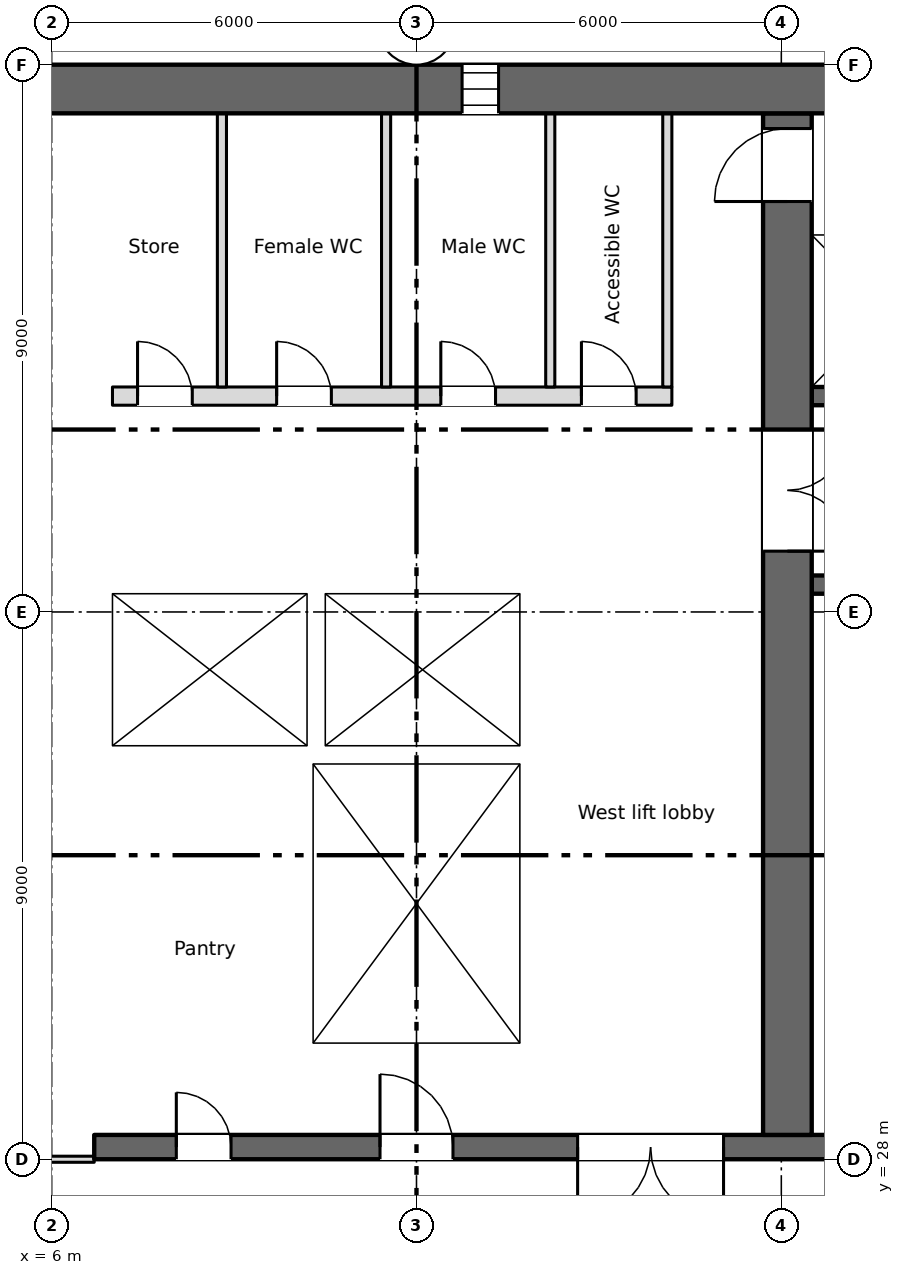
"""IFC4 building model, lengths in metres.
Left out: names, types, materials, properties, quantities, classifications, styles, units other than length and angle.
Written with IfcOpenShell. Run it as: python <this file> out.ifc"""

import sys

from ifc_helpers import new_model, si_unit, direction, frame, frame_2d, origin, place, context, subcontext, project, spatial, rectangle, extrude, element, fill, save


model = new_model("IFC4")
c1 = context("Model", 3, precision=1e-05, world=origin(), true_north=direction((0.0, 1.0)))
c2 = subcontext(c1, "Body", "Model", "MODEL_VIEW")
j1 = project(units=[si_unit("LENGTHUNIT", "METRE"), si_unit("PLANEANGLEUNIT", "RADIAN")], contexts=[c1])
p1 = place(None, origin())
s1 = spatial("IfcSite", under=j1, at=p1, CompositionType="ELEMENT")
p2 = place(p1, origin())
s2 = spatial("IfcBuilding", under=s1, at=p2, CompositionType="ELEMENT")
p3 = place(p2, frame((0.0, 0.0, 121.25)))
s3 = spatial("IfcBuildingStorey", under=s2, at=p3, CompositionType="ELEMENT", Elevation=121.25)
p4 = place(p3, frame((5.55, 45.6, 0.0), z_axis=(0.0, 0.0, 1.0), x_axis=(1.0, 0.0, 0.0)))
e1 = element("IfcWall", 1, at=p4, inside=s3, PredefinedType="SHEAR", context=c2, shape_type="SweptSolid", body=[
    extrude(rectangle(XDim=60.9, YDim=0.8, at=frame_2d((30.45, 0.0))), origin(), (0.0, 0.0, 1.0), 3.35),
])
p5 = place(p4, frame((7.2, 0.0, 0.6)))
e2 = element("IfcOpeningElement", 2, at=p5, cuts=e1, PredefinedType="OPENING", context=c2, shape_type="SweptSolid", body=[
    extrude(rectangle(XDim=0.6, YDim=2.4, at=frame_2d((0.3, 1.2))), frame((0.0, 0.41, 0.0), z_axis=(0.0, -1.0, 0.0), x_axis=(1.0, 0.0, 0.0)), (0.0, 0.0, 1.0), 0.82),
])
p6 = place(p3, frame((6.7, 28.2, 0.0), z_axis=(0.0, 0.0, 1.0), x_axis=(1.0, 0.0, 0.0)))
e3 = element("IfcWall", 3, at=p6, inside=s3, PredefinedType="SHEAR", context=c2, shape_type="SweptSolid", body=[
    extrude(rectangle(XDim=57.8, YDim=0.4, at=frame_2d((28.9, 0.0))), origin(), (0.0, 0.0, 1.0), 3.35),
])
p7 = place(p6, frame((12.062, 0.0, 0.0)))
e4 = element("IfcOpeningElement", 4, at=p7, cuts=e3, PredefinedType="OPENING", context=c2, shape_type="SweptSolid", body=[
    extrude(rectangle(XDim=0.9, YDim=2.1, at=frame_2d((0.45, 1.05))), frame((0.0, 0.21, 0.0), z_axis=(0.0, -1.0, 0.0), x_axis=(1.0, 0.0, 0.0)), (0.0, 0.0, 1.0), 0.42),
])
p8 = place(p6, frame((14.637, 0.0, 0.0)))
e5 = element("IfcOpeningElement", 5, at=p8, cuts=e3, PredefinedType="OPENING", context=c2, shape_type="SweptSolid", body=[
    extrude(rectangle(XDim=0.9, YDim=2.1, at=frame_2d((0.45, 1.05))), frame((0.0, 0.21, 0.0), z_axis=(0.0, -1.0, 0.0), x_axis=(1.0, 0.0, 0.0)), (0.0, 0.0, 1.0), 0.42),
])
p9 = place(p6, frame((49.062, 0.0, 0.0)))
e6 = element("IfcOpeningElement", 6, at=p9, cuts=e3, PredefinedType="OPENING", context=c2, shape_type="SweptSolid", body=[
    extrude(rectangle(XDim=0.9, YDim=2.1, at=frame_2d((0.45, 1.05))), frame((0.0, 0.21, 0.0), z_axis=(0.0, -1.0, 0.0), x_axis=(1.0, 0.0, 0.0)), (0.0, 0.0, 1.0), 0.42),
])
p10 = place(p6, frame((51.637, 0.0, 0.0)))
e7 = element("IfcOpeningElement", 7, at=p10, cuts=e3, PredefinedType="OPENING", context=c2, shape_type="SweptSolid", body=[
    extrude(rectangle(XDim=0.9, YDim=2.1, at=frame_2d((0.45, 1.05))), frame((0.0, 0.21, 0.0), z_axis=(0.0, -1.0, 0.0), x_axis=(1.0, 0.0, 0.0)), (0.0, 0.0, 1.0), 0.42),
])
p11 = place(p6, frame((1.35, 0.0, 0.0)))
e8 = element("IfcOpeningElement", 8, at=p11, cuts=e3, PredefinedType="OPENING", context=c2, shape_type="SweptSolid", body=[
    extrude(rectangle(XDim=0.9, YDim=2.1, at=frame_2d((0.45, 1.05))), frame((0.0, 0.21, 0.0), z_axis=(0.0, -1.0, 0.0), x_axis=(1.0, 0.0, 0.0)), (0.0, 0.0, 1.0), 0.42),
])
p12 = place(p6, frame((4.7, 0.0, 0.0)))
e9 = element("IfcOpeningElement", 9, at=p12, cuts=e3, PredefinedType="OPENING", context=c2, shape_type="SweptSolid", body=[
    extrude(rectangle(XDim=1.2, YDim=2.1, at=frame_2d((0.6, 1.05))), frame((0.0, 0.21, 0.0), z_axis=(0.0, -1.0, 0.0), x_axis=(1.0, 0.0, 0.0)), (0.0, 0.0, 1.0), 0.42),
])
p13 = place(p6, frame((31.7, 0.0, 0.0)))
e10 = element("IfcOpeningElement", 10, at=p13, cuts=e3, PredefinedType="OPENING", context=c2, shape_type="SweptSolid", body=[
    extrude(rectangle(XDim=1.2, YDim=2.1, at=frame_2d((0.6, 1.05))), frame((0.0, 0.21, 0.0), z_axis=(0.0, -1.0, 0.0), x_axis=(1.0, 0.0, 0.0)), (0.0, 0.0, 1.0), 0.42),
])
p14 = place(p6, frame((55.2, 0.0, 0.0)))
e11 = element("IfcOpeningElement", 11, at=p14, cuts=e3, PredefinedType="OPENING", context=c2, shape_type="SweptSolid", body=[
    extrude(rectangle(XDim=1.2, YDim=2.1, at=frame_2d((0.6, 1.05))), frame((0.0, 0.21, 0.0), z_axis=(0.0, -1.0, 0.0), x_axis=(1.0, 0.0, 0.0)), (0.0, 0.0, 1.0), 0.42),
])
p15 = place(p6, frame((21.7, 0.0, 0.0)))
e12 = element("IfcOpeningElement", 12, at=p15, cuts=e3, PredefinedType="OPENING", context=c2, shape_type="SweptSolid", body=[
    extrude(rectangle(XDim=1.2, YDim=2.1, at=frame_2d((0.6, 1.05))), frame((0.0, 0.21, 0.0), z_axis=(0.0, -1.0, 0.0), x_axis=(1.0, 0.0, 0.0)), (0.0, 0.0, 1.0), 0.42),
])
p16 = place(p6, frame((41.7, 0.0, 0.0)))
e13 = element("IfcOpeningElement", 13, at=p16, cuts=e3, PredefinedType="OPENING", context=c2, shape_type="SweptSolid", body=[
    extrude(rectangle(XDim=1.2, YDim=2.1, at=frame_2d((0.6, 1.05))), frame((0.0, 0.21, 0.0), z_axis=(0.0, -1.0, 0.0), x_axis=(1.0, 0.0, 0.0)), (0.0, 0.0, 1.0), 0.42),
])
p17 = place(p6, frame((24.85, 0.0, 0.0)))
e14 = element("IfcOpeningElement", 14, at=p17, cuts=e3, PredefinedType="OPENING", context=c2, shape_type="SweptSolid", body=[
    extrude(rectangle(XDim=2.4, YDim=2.1, at=frame_2d((1.2, 1.05))), frame((0.0, 0.21, 0.0), z_axis=(0.0, -1.0, 0.0), x_axis=(1.0, 0.0, 0.0)), (0.0, 0.0, 1.0), 0.42),
])
p18 = place(p6, frame((37.35, 0.0, 0.0)))
e15 = element("IfcOpeningElement", 15, at=p18, cuts=e3, PredefinedType="OPENING", context=c2, shape_type="SweptSolid", body=[
    extrude(rectangle(XDim=2.4, YDim=2.1, at=frame_2d((1.2, 1.05))), frame((0.0, 0.21, 0.0), z_axis=(0.0, -1.0, 0.0), x_axis=(1.0, 0.0, 0.0)), (0.0, 0.0, 1.0), 0.42),
])
p19 = place(p6, frame((7.95, 0.0, 0.0)))
e16 = element("IfcOpeningElement", 16, at=p19, cuts=e3, PredefinedType="OPENING", context=c2, shape_type="SweptSolid", body=[
    extrude(rectangle(XDim=2.4, YDim=2.1, at=frame_2d((1.2, 1.05))), frame((0.0, 0.21, 0.0), z_axis=(0.0, -1.0, 0.0), x_axis=(1.0, 0.0, 0.0)), (0.0, 0.0, 1.0), 0.42),
])
p20 = place(p6, frame((28.85, 0.0, 0.0)))
e17 = element("IfcOpeningElement", 17, at=p20, cuts=e3, PredefinedType="OPENING", context=c2, shape_type="SweptSolid", body=[
    extrude(rectangle(XDim=0.9, YDim=2.1, at=frame_2d((0.45, 1.05))), frame((0.0, 0.21, 0.0), z_axis=(0.0, -1.0, 0.0), x_axis=(1.0, 0.0, 0.0)), (0.0, 0.0, 1.0), 0.42),
])
p21 = place(p6, frame((34.85, 0.0, 0.0)))
e18 = element("IfcOpeningElement", 18, at=p21, cuts=e3, PredefinedType="OPENING", context=c2, shape_type="SweptSolid", body=[
    extrude(rectangle(XDim=0.9, YDim=2.1, at=frame_2d((0.45, 1.05))), frame((0.0, 0.21, 0.0), z_axis=(0.0, -1.0, 0.0), x_axis=(1.0, 0.0, 0.0)), (0.0, 0.0, 1.0), 0.42),
])
p22 = place(p3, frame((6.85, 28.4, 0.0), z_axis=(0.0, 0.0, 1.0), x_axis=(0.0, 1.0, 0.0)))
e19 = element("IfcWall", 19, at=p22, inside=s3, PredefinedType="SHEAR", context=c2, shape_type="SweptSolid", body=[
    extrude(rectangle(XDim=16.8, YDim=0.3, at=frame_2d((8.4, 0.0))), origin(), (0.0, 0.0, 1.0), 3.35),
])
p23 = place(p3, frame((18.1, 28.4, 0.0), z_axis=(0.0, 0.0, 1.0), x_axis=(0.0, 1.0, 0.0)))
e20 = element("IfcWall", 20, at=p23, inside=s3, PredefinedType="SHEAR", context=c2, shape_type="SweptSolid", body=[
    extrude(rectangle(XDim=16.8, YDim=0.8, at=frame_2d((8.4, 0.0))), origin(), (0.0, 0.0, 1.0), 3.35),
])
p24 = place(p23, frame((9.6, 0.0, 0.0)))
e21 = element("IfcOpeningElement", 21, at=p24, cuts=e20, PredefinedType="OPENING", context=c2, shape_type="SweptSolid", body=[
    extrude(rectangle(XDim=2.0, YDim=2.1, at=frame_2d((1.0, 1.05))), frame((0.0, 0.41, 0.0), z_axis=(0.0, -1.0, 0.0), x_axis=(1.0, 0.0, 0.0)), (0.0, 0.0, 1.0), 0.82),
])
p25 = place(p23, frame((15.35, 0.0, 0.0)))
e22 = element("IfcOpeningElement", 22, at=p25, cuts=e20, PredefinedType="OPENING", context=c2, shape_type="SweptSolid", body=[
    extrude(rectangle(XDim=1.2, YDim=2.1, at=frame_2d((0.6, 1.05))), frame((0.0, 0.41, 0.0), z_axis=(0.0, -1.0, 0.0), x_axis=(1.0, 0.0, 0.0)), (0.0, 0.0, 1.0), 0.82),
])
for number, where, z_axis, x_axis in (
    (23, (10.15, 28.4, 0.0), (0.0, 0.0, 1.0), (0.0, 1.0, 0.0)),
    (24, (13.85, 28.4, 0.0), (0.0, 0.0, 1.0), (0.0, 1.0, 0.0)),
):
    element("IfcWall", number, at=place(p3, frame(where, z_axis=z_axis, x_axis=x_axis)), inside=s3, PredefinedType="SHEAR", context=c2, shape_type="SweptSolid", body=[
        extrude(rectangle(XDim=6.1, YDim=0.3, at=frame_2d((3.05, 0.0))), origin(), (0.0, 0.0, 1.0), 3.35),
    ])
p26 = place(p3, frame((7.0, 34.65, 0.0), z_axis=(0.0, 0.0, 1.0), x_axis=(1.0, 0.0, 0.0)))
e25 = element("IfcWall", 25, at=p26, inside=s3, PredefinedType="SHEAR", context=c2, shape_type="SweptSolid", body=[
    extrude(rectangle(XDim=7.0, YDim=0.3, at=frame_2d((3.5, 0.0))), origin(), (0.0, 0.0, 1.0), 3.35),
])
p27 = place(p3, frame((18.5, 34.65, 0.0), z_axis=(0.0, 0.0, 1.0), x_axis=(1.0, 0.0, 0.0)))
e26 = element("IfcWall", 26, at=p27, inside=s3, PredefinedType="SHEAR", context=c2, shape_type="SweptSolid", body=[
    extrude(rectangle(XDim=12.2, YDim=0.3, at=frame_2d((6.1, 0.0))), origin(), (0.0, 0.0, 1.0), 3.35),
])
p28 = place(p27, frame((9.8, 0.0, 0.0)))
e27 = element("IfcOpeningElement", 27, at=p28, cuts=e26, PredefinedType="OPENING", context=c2, shape_type="SweptSolid", body=[
    extrude(rectangle(XDim=1.1, YDim=2.1, at=frame_2d((0.55, 1.05))), frame((0.0, 0.16, 0.0), z_axis=(0.0, -1.0, 0.0), x_axis=(1.0, 0.0, 0.0)), (0.0, 0.0, 1.0), 0.32),
])
p29 = place(p3, frame((7.0, 37.45, 0.0), z_axis=(0.0, 0.0, 1.0), x_axis=(1.0, 0.0, 0.0)))
e28 = element("IfcWall", 28, at=p29, inside=s3, PredefinedType="SHEAR", context=c2, shape_type="SweptSolid", body=[
    extrude(rectangle(XDim=7.0, YDim=0.3, at=frame_2d((3.5, 0.0))), origin(), (0.0, 0.0, 1.0), 3.35),
])
p30 = place(p3, frame((30.7, 37.45, 0.0), z_axis=(0.0, 0.0, 1.0), x_axis=(-1.0, 0.0, 0.0)))
e29 = element("IfcWall", 29, at=p30, inside=s3, PredefinedType="SHEAR", context=c2, shape_type="SweptSolid", body=[
    extrude(rectangle(XDim=12.2, YDim=0.3, at=frame_2d((6.1, 0.0))), origin(), (0.0, 0.0, 1.0), 3.35),
])
p31 = place(p30, frame((7.4, 0.0, 0.0)))
e30 = element("IfcOpeningElement", 30, at=p31, cuts=e29, PredefinedType="OPENING", context=c2, shape_type="SweptSolid", body=[
    extrude(rectangle(XDim=0.9, YDim=2.1, at=frame_2d((0.45, 1.05))), frame((0.0, 0.16, 0.0), z_axis=(0.0, -1.0, 0.0), x_axis=(1.0, 0.0, 0.0)), (0.0, 0.0, 1.0), 0.32),
])
p32 = place(p3, frame((13.85, 34.8, 0.0), z_axis=(0.0, 0.0, 1.0), x_axis=(0.0, 1.0, 0.0)))
e31 = element("IfcWall", 31, at=p32, inside=s3, PredefinedType="SHEAR", context=c2, shape_type="SweptSolid", body=[
    extrude(rectangle(XDim=2.5, YDim=0.3, at=frame_2d((1.25, 0.0))), origin(), (0.0, 0.0, 1.0), 3.35),
])
p33 = place(p3, frame((18.5, 40.55, 0.0), z_axis=(0.0, 0.0, 1.0), x_axis=(1.0, 0.0, 0.0)))
e32 = element("IfcWall", 32, at=p33, inside=s3, PredefinedType="SHEAR", context=c2, shape_type="SweptSolid", body=[
    extrude(rectangle(XDim=41.0, YDim=0.3, at=frame_2d((20.5, 0.0))), origin(), (0.0, 0.0, 1.0), 3.35),
])
p34 = place(p33, frame((18.65, 0.0, 0.0)))
e33 = element("IfcOpeningElement", 33, at=p34, cuts=e32, PredefinedType="OPENING", context=c2, shape_type="SweptSolid", body=[
    extrude(rectangle(XDim=0.9, YDim=2.1, at=frame_2d((0.45, 1.05))), frame((0.0, 0.16, 0.0), z_axis=(0.0, -1.0, 0.0), x_axis=(1.0, 0.0, 0.0)), (0.0, 0.0, 1.0), 0.32),
])
p35 = place(p33, frame((6.175, 0.0, 0.0)))
e34 = element("IfcOpeningElement", 34, at=p35, cuts=e32, PredefinedType="OPENING", context=c2, shape_type="SweptSolid", body=[
    extrude(rectangle(XDim=1.1, YDim=2.1, at=frame_2d((0.55, 1.05))), frame((0.0, 0.16, 0.0), z_axis=(0.0, -1.0, 0.0), x_axis=(1.0, 0.0, 0.0)), (0.0, 0.0, 1.0), 0.32),
])
p36 = place(p33, frame((8.925, 0.0, 0.0)))
e35 = element("IfcOpeningElement", 35, at=p36, cuts=e32, PredefinedType="OPENING", context=c2, shape_type="SweptSolid", body=[
    extrude(rectangle(XDim=1.1, YDim=2.1, at=frame_2d((0.55, 1.05))), frame((0.0, 0.16, 0.0), z_axis=(0.0, -1.0, 0.0), x_axis=(1.0, 0.0, 0.0)), (0.0, 0.0, 1.0), 0.32),
])
p37 = place(p33, frame((11.675, 0.0, 0.0)))
e36 = element("IfcOpeningElement", 36, at=p37, cuts=e32, PredefinedType="OPENING", context=c2, shape_type="SweptSolid", body=[
    extrude(rectangle(XDim=1.1, YDim=2.1, at=frame_2d((0.55, 1.05))), frame((0.0, 0.16, 0.0), z_axis=(0.0, -1.0, 0.0), x_axis=(1.0, 0.0, 0.0)), (0.0, 0.0, 1.0), 0.32),
])
p38 = place(p33, frame((30.925, 0.0, 0.0)))
e37 = element("IfcOpeningElement", 37, at=p38, cuts=e32, PredefinedType="OPENING", context=c2, shape_type="SweptSolid", body=[
    extrude(rectangle(XDim=1.1, YDim=2.1, at=frame_2d((0.55, 1.05))), frame((0.0, 0.16, 0.0), z_axis=(0.0, -1.0, 0.0), x_axis=(1.0, 0.0, 0.0)), (0.0, 0.0, 1.0), 0.32),
])
p39 = place(p33, frame((33.675, 0.0, 0.0)))
e38 = element("IfcOpeningElement", 38, at=p39, cuts=e32, PredefinedType="OPENING", context=c2, shape_type="SweptSolid", body=[
    extrude(rectangle(XDim=1.1, YDim=2.1, at=frame_2d((0.55, 1.05))), frame((0.0, 0.16, 0.0), z_axis=(0.0, -1.0, 0.0), x_axis=(1.0, 0.0, 0.0)), (0.0, 0.0, 1.0), 0.32),
])
p40 = place(p33, frame((36.375, 0.0, 0.0)))
e39 = element("IfcOpeningElement", 39, at=p40, cuts=e32, PredefinedType="OPENING", context=c2, shape_type="SweptSolid", body=[
    extrude(rectangle(XDim=1.2, YDim=2.1, at=frame_2d((0.6, 1.05))), frame((0.0, 0.16, 0.0), z_axis=(0.0, -1.0, 0.0), x_axis=(1.0, 0.0, 0.0)), (0.0, 0.0, 1.0), 0.32),
])
p41 = place(p33, frame((39.15, 0.0, 0.0)))
e40 = element("IfcOpeningElement", 40, at=p41, cuts=e32, PredefinedType="OPENING", context=c2, shape_type="SweptSolid", body=[
    extrude(rectangle(XDim=1.2, YDim=2.1, at=frame_2d((0.6, 1.05))), frame((0.0, 0.16, 0.0), z_axis=(0.0, -1.0, 0.0), x_axis=(1.0, 0.0, 0.0)), (0.0, 0.0, 1.0), 0.32),
])
p42 = place(p3, frame((18.5, 43.35, 0.0), z_axis=(0.0, 0.0, 1.0), x_axis=(1.0, 0.0, 0.0)))
e41 = element("IfcWall", 41, at=p42, inside=s3, PredefinedType="SHEAR", context=c2, shape_type="SweptSolid", body=[
    extrude(rectangle(XDim=41.0, YDim=0.3, at=frame_2d((20.5, 0.0))), origin(), (0.0, 0.0, 1.0), 3.35),
])
p43 = place(p3, frame((7.0, 40.55, 0.0), z_axis=(0.0, 0.0, 1.0), x_axis=(1.0, 0.0, 0.0)))
e42 = element("IfcWall", 42, at=p43, inside=s3, PredefinedType="PARTITIONING", context=c2, shape_type="SweptSolid", body=[
    extrude(rectangle(XDim=9.2, YDim=0.3, at=frame_2d((4.6, 0.0))), origin(), (0.0, 0.0, 1.0), 3.35),
])
p44 = place(p43, frame((0.413, 0.0, 0.0)))
e43 = element("IfcOpeningElement", 43, at=p44, cuts=e42, PredefinedType="OPENING", context=c2, shape_type="SweptSolid", body=[
    extrude(rectangle(XDim=0.9, YDim=2.1, at=frame_2d((0.45, 1.05))), frame((0.0, 0.16, 0.0), z_axis=(0.0, -1.0, 0.0), x_axis=(1.0, 0.0, 0.0)), (0.0, 0.0, 1.0), 0.32),
])
p45 = place(p43, frame((2.7, 0.0, 0.0)))
e44 = element("IfcOpeningElement", 44, at=p45, cuts=e42, PredefinedType="OPENING", context=c2, shape_type="SweptSolid", body=[
    extrude(rectangle(XDim=0.9, YDim=2.1, at=frame_2d((0.45, 1.05))), frame((0.0, 0.16, 0.0), z_axis=(0.0, -1.0, 0.0), x_axis=(1.0, 0.0, 0.0)), (0.0, 0.0, 1.0), 0.32),
])
p46 = place(p43, frame((5.4, 0.0, 0.0)))
e45 = element("IfcOpeningElement", 45, at=p46, cuts=e42, PredefinedType="OPENING", context=c2, shape_type="SweptSolid", body=[
    extrude(rectangle(XDim=0.9, YDim=2.1, at=frame_2d((0.45, 1.05))), frame((0.0, 0.16, 0.0), z_axis=(0.0, -1.0, 0.0), x_axis=(1.0, 0.0, 0.0)), (0.0, 0.0, 1.0), 0.32),
])
p47 = place(p43, frame((7.712, 0.0, 0.0)))
e46 = element("IfcOpeningElement", 46, at=p47, cuts=e42, PredefinedType="OPENING", context=c2, shape_type="SweptSolid", body=[
    extrude(rectangle(XDim=0.9, YDim=2.1, at=frame_2d((0.45, 1.05))), frame((0.0, 0.16, 0.0), z_axis=(0.0, -1.0, 0.0), x_axis=(1.0, 0.0, 0.0)), (0.0, 0.0, 1.0), 0.32),
])
p48 = place(p3, frame((10.35, 34.8, 0.0), z_axis=(0.0, 0.0, 1.0), x_axis=(0.0, 1.0, 0.0)))
e47 = element("IfcWall", 47, at=p48, inside=s3, PredefinedType="SHEAR", context=c2, shape_type="SweptSolid", body=[
    extrude(rectangle(XDim=2.5, YDim=0.3, at=frame_2d((1.25, 0.0))), origin(), (0.0, 0.0, 1.0), 3.35),
])
for number, where, z_axis, x_axis in (
    (48, (16.125, 40.7, 0.0), (0.0, 0.0, 1.0), (0.0, 1.0, 0.0)),
    (49, (8.8, 40.7, 0.0), (0.0, 0.0, 1.0), (0.0, 1.0, 0.0)),
    (50, (11.5, 40.7, 0.0), (0.0, 0.0, 1.0), (0.0, 1.0, 0.0)),
    (51, (14.2, 40.7, 0.0), (0.0, 0.0, 1.0), (0.0, 1.0, 0.0)),
):
    element("IfcWall", number, at=place(p3, frame(where, z_axis=z_axis, x_axis=x_axis)), inside=s3, PredefinedType="PARTITIONING", context=c2, shape_type="SweptSolid", body=[
        extrude(rectangle(XDim=4.5, YDim=0.15, at=frame_2d((2.25, 0.0))), origin(), (0.0, 0.0, 1.0), 3.35),
    ])
p49 = place(p3, frame((0.7, 28.0, 0.0), z_axis=(0.0, 0.0, 1.0), x_axis=(1.0, 0.0, 0.0)))
e52 = element("IfcWall", 52, at=p49, inside=s3, PredefinedType="PARTITIONING", context=c2, shape_type="SweptSolid", body=[
    extrude(rectangle(XDim=6.0, YDim=0.1, at=frame_2d((3.0, 0.0))), origin(), (0.0, 0.0, 1.0), 3.35),
])
p50 = place(p49, frame((2.1, 0.0, 0.0)))
e53 = element("IfcOpeningElement", 53, at=p50, cuts=e52, PredefinedType="OPENING", context=c2, shape_type="SweptSolid", body=[
    extrude(rectangle(XDim=1.8, YDim=2.1, at=frame_2d((0.9, 1.05))), frame((0.0, 0.06, 0.0), z_axis=(0.0, -1.0, 0.0), x_axis=(1.0, 0.0, 0.0)), (0.0, 0.0, 1.0), 0.12),
])
p51 = place(p5, origin())
e54 = element("IfcWindow", 54, at=p51, inside=s3, PartitioningType="SINGLE_PANEL", PredefinedType="WINDOW", context=c2, shape_type="SweptSolid", body=[
    extrude(rectangle(XDim=0.6, YDim=2.4, at=frame_2d((0.3, 1.2))), frame((0.0, 0.03, 0.0), z_axis=(0.0, -1.0, 0.0), x_axis=(1.0, 0.0, 0.0)), (0.0, 0.0, 1.0), 0.06),
])
fill(e2, e54)
p52 = place(p11, origin())
e55 = element("IfcDoor", 55, at=p52, inside=s3, OperationType="SINGLE_SWING_LEFT", PredefinedType="DOOR", context=c2, shape_type="SweptSolid", body=[
    extrude(rectangle(XDim=0.9, YDim=2.1, at=frame_2d((0.45, 1.05))), frame((0.0, 0.025, 0.0), z_axis=(0.0, -1.0, 0.0), x_axis=(1.0, 0.0, 0.0)), (0.0, 0.0, 1.0), 0.05),
])
fill(e8, e55)
p53 = place(p44, origin())
e56 = element("IfcDoor", 56, at=p53, inside=s3, OperationType="SINGLE_SWING_LEFT", PredefinedType="DOOR", context=c2, shape_type="SweptSolid", body=[
    extrude(rectangle(XDim=0.9, YDim=2.1, at=frame_2d((0.45, 1.05))), frame((0.0, 0.025, 0.0), z_axis=(0.0, -1.0, 0.0), x_axis=(1.0, 0.0, 0.0)), (0.0, 0.0, 1.0), 0.05),
])
fill(e43, e56)
p54 = place(p45, origin())
e57 = element("IfcDoor", 57, at=p54, inside=s3, OperationType="SINGLE_SWING_LEFT", PredefinedType="DOOR", context=c2, shape_type="SweptSolid", body=[
    extrude(rectangle(XDim=0.9, YDim=2.1, at=frame_2d((0.45, 1.05))), frame((0.0, 0.025, 0.0), z_axis=(0.0, -1.0, 0.0), x_axis=(1.0, 0.0, 0.0)), (0.0, 0.0, 1.0), 0.05),
])
fill(e44, e57)
p55 = place(p46, origin())
e58 = element("IfcDoor", 58, at=p55, inside=s3, OperationType="SINGLE_SWING_LEFT", PredefinedType="DOOR", context=c2, shape_type="SweptSolid", body=[
    extrude(rectangle(XDim=0.9, YDim=2.1, at=frame_2d((0.45, 1.05))), frame((0.0, 0.025, 0.0), z_axis=(0.0, -1.0, 0.0), x_axis=(1.0, 0.0, 0.0)), (0.0, 0.0, 1.0), 0.05),
])
fill(e45, e58)
p56 = place(p47, origin())
e59 = element("IfcDoor", 59, at=p56, inside=s3, OperationType="SINGLE_SWING_LEFT", PredefinedType="DOOR", context=c2, shape_type="SweptSolid", body=[
    extrude(rectangle(XDim=0.9, YDim=2.1, at=frame_2d((0.45, 1.05))), frame((0.0, 0.025, 0.0), z_axis=(0.0, -1.0, 0.0), x_axis=(1.0, 0.0, 0.0)), (0.0, 0.0, 1.0), 0.05),
])
fill(e46, e59)
p57 = place(p12, origin())
e60 = element("IfcDoor", 60, at=p57, inside=s3, OperationType="SINGLE_SWING_LEFT", PredefinedType="DOOR", context=c2, shape_type="SweptSolid", body=[
    extrude(rectangle(XDim=1.2, YDim=2.1, at=frame_2d((0.6, 1.05))), frame((0.0, 0.025, 0.0), z_axis=(0.0, -1.0, 0.0), x_axis=(1.0, 0.0, 0.0)), (0.0, 0.0, 1.0), 0.05),
])
fill(e9, e60)
p58 = place(p19, origin())
e61 = element("IfcDoor", 61, at=p58, inside=s3, OperationType="DOUBLE_DOOR_SINGLE_SWING", PredefinedType="DOOR", context=c2, shape_type="SweptSolid", body=[
    extrude(rectangle(XDim=2.4, YDim=2.1, at=frame_2d((1.2, 1.05))), frame((0.0, 0.025, 0.0), z_axis=(0.0, -1.0, 0.0), x_axis=(1.0, 0.0, 0.0)), (0.0, 0.0, 1.0), 0.05),
])
fill(e16, e61)
p59 = place(p24, origin())
e62 = element("IfcDoor", 62, at=p59, inside=s3, OperationType="DOUBLE_DOOR_SINGLE_SWING", PredefinedType="DOOR", context=c2, shape_type="SweptSolid", body=[
    extrude(rectangle(XDim=2.0, YDim=2.1, at=frame_2d((1.0, 1.05))), frame((0.0, 0.025, 0.0), z_axis=(0.0, -1.0, 0.0), x_axis=(1.0, 0.0, 0.0)), (0.0, 0.0, 1.0), 0.05),
])
fill(e21, e62)
p60 = place(p25, origin())
e63 = element("IfcDoor", 63, at=p60, inside=s3, OperationType="SINGLE_SWING_LEFT", PredefinedType="DOOR", context=c2, shape_type="SweptSolid", body=[
    extrude(rectangle(XDim=1.2, YDim=2.1, at=frame_2d((0.6, 1.05))), frame((0.0, 0.025, 0.0), z_axis=(0.0, -1.0, 0.0), x_axis=(1.0, 0.0, 0.0)), (0.0, 0.0, 1.0), 0.05),
])
fill(e22, e63)
save(model, sys.argv[1])
